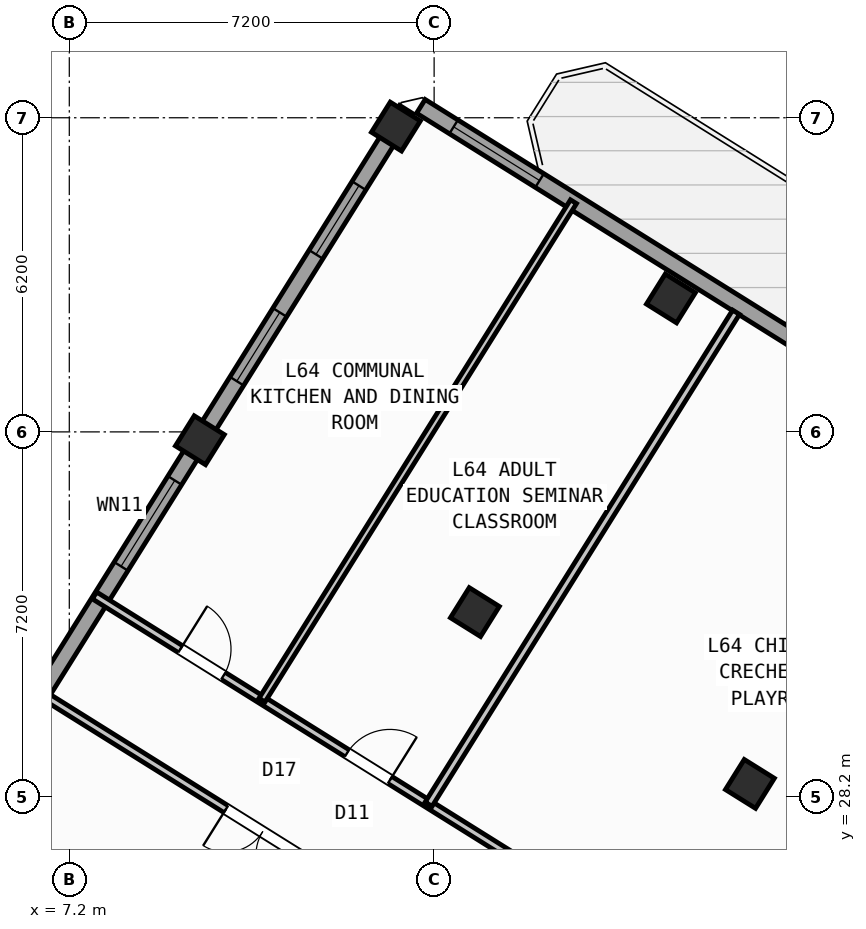
"""IFC4 building model, lengths in metres.
Left out: names, types, materials, properties, quantities, classifications, styles, units other than length and angle.
Written with IfcOpenShell. Run it as: python <this file> out.ifc"""

import sys

from ifc_helpers import new_model, si_unit, direction, frame, frame_2d, origin, origin_2d, place, context, subcontext, project, spatial, rectangle, hollow_rectangle, extrude, source, transform, mapped, element, fill, save


model = new_model("IFC4")
c1 = context("Model", 3, precision=1e-05, world=origin(), true_north=direction((0.0, 1.0)))
c2 = subcontext(c1, "Body", "Model", "MODEL_VIEW")
j1 = project(units=[si_unit("LENGTHUNIT", "METRE"), si_unit("PLANEANGLEUNIT", "RADIAN")], contexts=[c1])
p1 = place(None, origin())
s1 = spatial("IfcSite", under=j1, at=p1, CompositionType="ELEMENT")
p2 = place(p1, origin())
s2 = spatial("IfcBuilding", under=s1, at=p2, CompositionType="ELEMENT")
p3 = place(p2, frame((0.0, 0.0, 254.7)))
s3 = spatial("IfcBuildingStorey", under=s2, at=p3, CompositionType="ELEMENT", Elevation=254.7)
m1 = source(origin(), c2, "Body", "SweptSolid", [
    extrude(hollow_rectangle(XDim=0.7, YDim=0.7, WallThickness=0.028, at=origin_2d()), origin(), (0.0, 0.0, 1.0), 4.5),
])
for number, where, z_axis, x_axis in (
    (1, (20.632, 28.452, 0.0), (0.0, 0.0, 1.0), (-0.848, 0.53, 0.0)),
    (2, (19.073, 38.034, 0.0), (0.0, 0.0, 1.0), (-0.848, 0.53, 0.0)),
    (3, (15.205, 31.844, 0.0), (0.0, 0.0, 1.0), (-0.848, 0.53, 0.0)),
    (4, (13.646, 41.426, 0.0), (0.0, 0.0, 1.0), (-0.848, 0.53, 0.0)),
    (5, (9.777, 35.235, 0.0), (0.0, 0.0, 1.0), (-0.848, 0.53, 0.0)),
):
    element("IfcColumn", number, at=place(p3, frame(where, z_axis=z_axis, x_axis=x_axis)), inside=s3, PredefinedType="COLUMN", context=c2, shape_type="MappedRepresentation", body=[
        mapped(m1, transform((0.0, 0.0, 0.0), scale=1.0)),
    ])
p4 = place(p3, frame((2.415, 23.452, 0.0), z_axis=(0.0, 0.0, 1.0), x_axis=(0.52991049553, 0.848053575387, 0.0)))
e6 = element("IfcWall", 6, at=p4, inside=s3, PredefinedType="STANDARD", context=c2, shape_type="SweptSolid", body=[
    extrude(rectangle(XDim=21.587, YDim=0.32, at=frame_2d((10.794, 0.0))), origin(), (0.0, 0.0, 1.0), 3.775),
])
p5 = place(p4, frame((2.131, 0.0, 0.7)))
e7 = element("IfcOpeningElement", 7, at=p5, cuts=e6, PredefinedType="OPENING", context=c2, shape_type="SweptSolid", body=[
    extrude(rectangle(XDim=2.6, YDim=2.0, at=frame_2d((1.3, 1.0))), frame((0.0, 0.17, 0.0), z_axis=(0.0, -1.0, 0.0), x_axis=(1.0, 0.0, 0.0)), (0.0, 0.0, 1.0), 0.34),
])
p6 = place(p4, frame((10.959, 0.0, 0.75)))
e8 = element("IfcOpeningElement", 8, at=p6, cuts=e6, PredefinedType="OPENING", context=c2, shape_type="SweptSolid", body=[
    extrude(rectangle(XDim=2.0, YDim=1.95, at=frame_2d((1.0, 0.975))), frame((0.0, 0.17, 0.0), z_axis=(0.0, -1.0, 0.0), x_axis=(1.0, 0.0, 0.0)), (0.0, 0.0, 1.0), 0.34),
])
p7 = place(p4, frame((15.269, 0.0, 0.85)))
e9 = element("IfcOpeningElement", 9, at=p7, cuts=e6, PredefinedType="OPENING", context=c2, shape_type="SweptSolid", body=[
    extrude(rectangle(XDim=1.6, YDim=1.8, at=frame_2d((0.8, 0.9))), frame((0.0, 0.17, 0.0), z_axis=(0.0, -1.0, 0.0), x_axis=(1.0, 0.0, 0.0)), (0.0, 0.0, 1.0), 0.34),
])
p8 = place(p4, frame((18.219, 0.0, 0.85)))
e10 = element("IfcOpeningElement", 10, at=p8, cuts=e6, PredefinedType="OPENING", context=c2, shape_type="SweptSolid", body=[
    extrude(rectangle(XDim=1.6, YDim=1.8, at=frame_2d((0.8, 0.9))), frame((0.0, 0.17, 0.0), z_axis=(0.0, -1.0, 0.0), x_axis=(1.0, 0.0, 0.0)), (0.0, 0.0, 1.0), 0.34),
])
p9 = place(p3, frame((14.138, 41.825, 0.0), z_axis=(0.0, 0.0, 1.0), x_axis=(0.848046498049, -0.529921821731, 0.0)))
e11 = element("IfcWall", 11, at=p9, inside=s3, PredefinedType="STANDARD", context=c2, shape_type="SweptSolid", body=[
    extrude(rectangle(XDim=31.588, YDim=0.32, at=frame_2d((15.794, 0.0))), origin(), (0.0, 0.0, 1.0), 4.25),
])
p10 = place(p9, frame((9.946, 0.0, 0.0)))
e12 = element("IfcOpeningElement", 12, at=p10, cuts=e11, PredefinedType="OPENING", context=c2, shape_type="SweptSolid", body=[
    extrude(rectangle(XDim=1.05, YDim=2.15, at=frame_2d((0.525, 1.075))), frame((0.0, 0.17, 0.0), z_axis=(0.0, -1.0, 0.0), x_axis=(1.0, 0.0, 0.0)), (0.0, 0.0, 1.0), 0.34),
])
p11 = place(p9, frame((0.763, 0.0, 0.75)))
e13 = element("IfcOpeningElement", 13, at=p11, cuts=e11, PredefinedType="OPENING", context=c2, shape_type="SweptSolid", body=[
    extrude(rectangle(XDim=2.0, YDim=1.95, at=frame_2d((1.0, 0.975))), frame((0.0, 0.17, 0.0), z_axis=(0.0, -1.0, 0.0), x_axis=(1.0, 0.0, 0.0)), (0.0, 0.0, 1.0), 0.34),
])
p12 = place(p9, frame((13.574, 0.0, 0.75)))
e14 = element("IfcOpeningElement", 14, at=p12, cuts=e11, PredefinedType="OPENING", context=c2, shape_type="SweptSolid", body=[
    extrude(rectangle(XDim=2.0, YDim=1.95, at=frame_2d((1.0, 0.975))), frame((0.0, 0.17, 0.0), z_axis=(0.0, -1.0, 0.0), x_axis=(1.0, 0.0, 0.0)), (0.0, 0.0, 1.0), 0.34),
])
p13 = place(p9, frame((21.744, 0.0, 0.85)))
e15 = element("IfcOpeningElement", 15, at=p13, cuts=e11, PredefinedType="OPENING", context=c2, shape_type="SweptSolid", body=[
    extrude(rectangle(XDim=1.6, YDim=1.8, at=frame_2d((0.8, 0.9))), frame((0.0, 0.17, 0.0), z_axis=(0.0, -1.0, 0.0), x_axis=(1.0, 0.0, 0.0)), (0.0, 0.0, 1.0), 0.34),
])
p14 = place(p9, frame((27.444, 0.0, 0.85)))
e16 = element("IfcOpeningElement", 16, at=p14, cuts=e11, PredefinedType="OPENING", context=c2, shape_type="SweptSolid", body=[
    extrude(rectangle(XDim=1.6, YDim=1.8, at=frame_2d((0.8, 0.9))), frame((0.0, 0.17, 0.0), z_axis=(0.0, -1.0, 0.0), x_axis=(1.0, 0.0, 0.0)), (0.0, 0.0, 1.0), 0.34),
])
p15 = place(p3, frame((21.885, 23.306, 0.0), z_axis=(0.0, 0.0, 1.0), x_axis=(-0.848052408131, 0.529912363569, 0.0)))
e17 = element("IfcWall", 17, at=p15, inside=s3, PredefinedType="PARTITIONING", context=c2, shape_type="SweptSolid", body=[
    extrude(rectangle(XDim=16.73, YDim=0.16, at=frame_2d((8.365, 0.0))), origin(), (0.0, 0.0, 1.0), 4.24),
])
p16 = place(p15, frame((1.8, 0.0, 0.0)))
e18 = element("IfcOpeningElement", 18, at=p16, cuts=e17, PredefinedType="OPENING", context=c2, shape_type="SweptSolid", body=[
    extrude(rectangle(XDim=1.0, YDim=2.1, at=frame_2d((0.5, 1.05))), frame((0.0, 0.09, 0.0), z_axis=(0.0, -1.0, 0.0), x_axis=(1.0, 0.0, 0.0)), (0.0, 0.0, 1.0), 0.18),
])
p17 = place(p15, frame((9.855, 0.0, 0.0)))
e19 = element("IfcOpeningElement", 19, at=p17, cuts=e17, PredefinedType="OPENING", context=c2, shape_type="SweptSolid", body=[
    extrude(rectangle(XDim=1.0, YDim=2.1, at=frame_2d((0.5, 1.05))), frame((0.0, 0.09, 0.0), z_axis=(0.0, -1.0, 0.0), x_axis=(1.0, 0.0, 0.0)), (0.0, 0.0, 1.0), 0.18),
])
p18 = place(p15, frame((13.732, 0.0, 0.0)))
e20 = element("IfcOpeningElement", 20, at=p18, cuts=e17, PredefinedType="OPENING", context=c2, shape_type="SweptSolid", body=[
    extrude(rectangle(XDim=1.0, YDim=2.1, at=frame_2d((0.5, 1.05))), frame((0.0, 0.09, 0.0), z_axis=(0.0, -1.0, 0.0), x_axis=(1.0, 0.0, 0.0)), (0.0, 0.0, 1.0), 0.18),
])
p19 = place(p3, frame((20.719, 21.44, 0.0), z_axis=(0.0, 0.0, 1.0), x_axis=(-0.848048310262, 0.529918921593, 0.0)))
e21 = element("IfcWall", 21, at=p19, inside=s3, PredefinedType="PARTITIONING", context=c2, shape_type="SweptSolid", body=[
    extrude(rectangle(XDim=16.73, YDim=0.16, at=frame_2d((8.365, 0.0))), origin(), (0.0, 0.0, 1.0), 4.24),
])
p20 = place(p19, frame((1.68, 0.0, 0.0)))
e22 = element("IfcOpeningElement", 22, at=p20, cuts=e21, PredefinedType="OPENING", context=c2, shape_type="SweptSolid", body=[
    extrude(rectangle(XDim=1.7, YDim=2.2, at=frame_2d((0.85, 1.1))), frame((0.0, 0.09, 0.0), z_axis=(0.0, -1.0, 0.0), x_axis=(1.0, 0.0, 0.0)), (0.0, 0.0, 1.0), 0.18),
])
p21 = place(p19, frame((10.595, 0.0, 0.0)))
e23 = element("IfcOpeningElement", 23, at=p21, cuts=e21, PredefinedType="OPENING", context=c2, shape_type="SweptSolid", body=[
    extrude(rectangle(XDim=1.7, YDim=2.2, at=frame_2d((0.85, 1.1))), frame((0.0, 0.09, 0.0), z_axis=(0.0, -1.0, 0.0), x_axis=(1.0, 0.0, 0.0)), (0.0, 0.0, 1.0), 0.18),
])
p22 = place(p3, frame((20.359, 37.761, 0.0), z_axis=(0.0, 0.0, 1.0), x_axis=(-0.529905022231, -0.848056995381, 0.0)))
e24 = element("IfcWall", 24, at=p22, inside=s3, PredefinedType="PARTITIONING", context=c2, shape_type="SweptSolid", body=[
    extrude(rectangle(XDim=11.45, YDim=0.16, at=frame_2d((5.725, 0.0))), origin(), (0.0, 0.0, 1.0), 4.24),
])
p23 = place(p3, frame((17.15, 39.943, 0.0), z_axis=(0.0, 0.0, 1.0), x_axis=(-0.529936507712, -0.848037320991, 0.0)))
e25 = element("IfcWall", 25, at=p23, inside=s3, PredefinedType="PLUMBINGWALL", context=c2, shape_type="SweptSolid", body=[
    extrude(rectangle(XDim=11.6, YDim=0.14, at=frame_2d((5.8, 0.0))), origin(), (0.0, 0.0, 1.0), 4.24),
])
m2 = source(origin(), c2, "Body", "SweptSolid", [
    extrude(rectangle(XDim=2.0, YDim=1.95, at=frame_2d((1.0, 0.975))), frame((0.0, 0.03, 0.0), z_axis=(0.0, -1.0, 0.0), x_axis=(1.0, 0.0, 0.0)), (0.0, 0.0, 1.0), 0.06),
])
p24 = place(p6, origin())
e26 = element("IfcWindow", 26, at=p24, inside=s3, PartitioningType="SINGLE_PANEL", PredefinedType="WINDOW", context=c2, shape_type="MappedRepresentation", body=[
    mapped(m2, transform((0.0, 0.0, 0.0), scale=1.0)),
])
fill(e8, e26)
m3 = source(origin(), c2, "Body", "SweptSolid", [
    extrude(rectangle(XDim=1.6, YDim=1.8, at=frame_2d((0.8, 0.9))), frame((0.0, 0.03, 0.0), z_axis=(0.0, -1.0, 0.0), x_axis=(1.0, 0.0, 0.0)), (0.0, 0.0, 1.0), 0.06),
])
p25 = place(p7, origin())
e27 = element("IfcWindow", 27, at=p25, inside=s3, PartitioningType="SINGLE_PANEL", PredefinedType="WINDOW", context=c2, shape_type="MappedRepresentation", body=[
    mapped(m3, transform((0.0, 0.0, 0.0), scale=1.0)),
])
fill(e9, e27)
p26 = place(p8, origin())
e28 = element("IfcWindow", 28, at=p26, inside=s3, PartitioningType="SINGLE_PANEL", PredefinedType="WINDOW", context=c2, shape_type="MappedRepresentation", body=[
    mapped(m3, transform((0.0, 0.0, 0.0), scale=1.0)),
])
fill(e10, e28)
p27 = place(p11, origin())
e29 = element("IfcWindow", 29, at=p27, inside=s3, PartitioningType="SINGLE_PANEL", PredefinedType="WINDOW", context=c2, shape_type="MappedRepresentation", body=[
    mapped(m2, transform((0.0, 0.0, 0.0), scale=1.0)),
])
fill(e13, e29)
m4 = source(origin(), c2, "Body", "SweptSolid", [
    extrude(rectangle(XDim=1.7, YDim=2.2, at=frame_2d((0.85, 1.1))), frame((0.0, 0.025, 0.0), z_axis=(0.0, -1.0, 0.0), x_axis=(1.0, 0.0, 0.0)), (0.0, 0.0, 1.0), 0.05),
])
p28 = place(p21, origin())
e30 = element("IfcDoor", 30, at=p28, inside=s3, OperationType="DOUBLE_DOOR_SINGLE_SWING", PredefinedType="DOOR", context=c2, shape_type="MappedRepresentation", body=[
    mapped(m4, transform((0.0, 0.0, 0.0), scale=1.0)),
])
fill(e23, e30)
m5 = source(origin(), c2, "Body", "SweptSolid", [
    extrude(rectangle(XDim=1.0, YDim=2.1, at=frame_2d((0.5, 1.05))), frame((0.0, 0.025, 0.0), z_axis=(0.0, -1.0, 0.0), x_axis=(1.0, 0.0, 0.0)), (0.0, 0.0, 1.0), 0.05),
])
p29 = place(p17, frame((1.0, 0.0, 0.0), z_axis=(0.0, 0.0, 1.0), x_axis=(-1.0, 0.0, 0.0)))
e31 = element("IfcDoor", 31, at=p29, inside=s3, OperationType="SINGLE_SWING_RIGHT", PredefinedType="DOOR", context=c2, shape_type="MappedRepresentation", body=[
    mapped(m5, transform((0.0, 0.0, 0.0), scale=1.0)),
])
fill(e19, e31)
p30 = place(p18, frame((1.0, 0.0, 0.0), z_axis=(0.0, 0.0, 1.0), x_axis=(-1.0, 0.0, 0.0)))
e32 = element("IfcDoor", 32, at=p30, inside=s3, OperationType="SINGLE_SWING_LEFT", PredefinedType="DOOR", context=c2, shape_type="MappedRepresentation", body=[
    mapped(m5, transform((0.0, 0.0, 0.0), scale=1.0)),
])
fill(e20, e32)
save(model, sys.argv[1])
